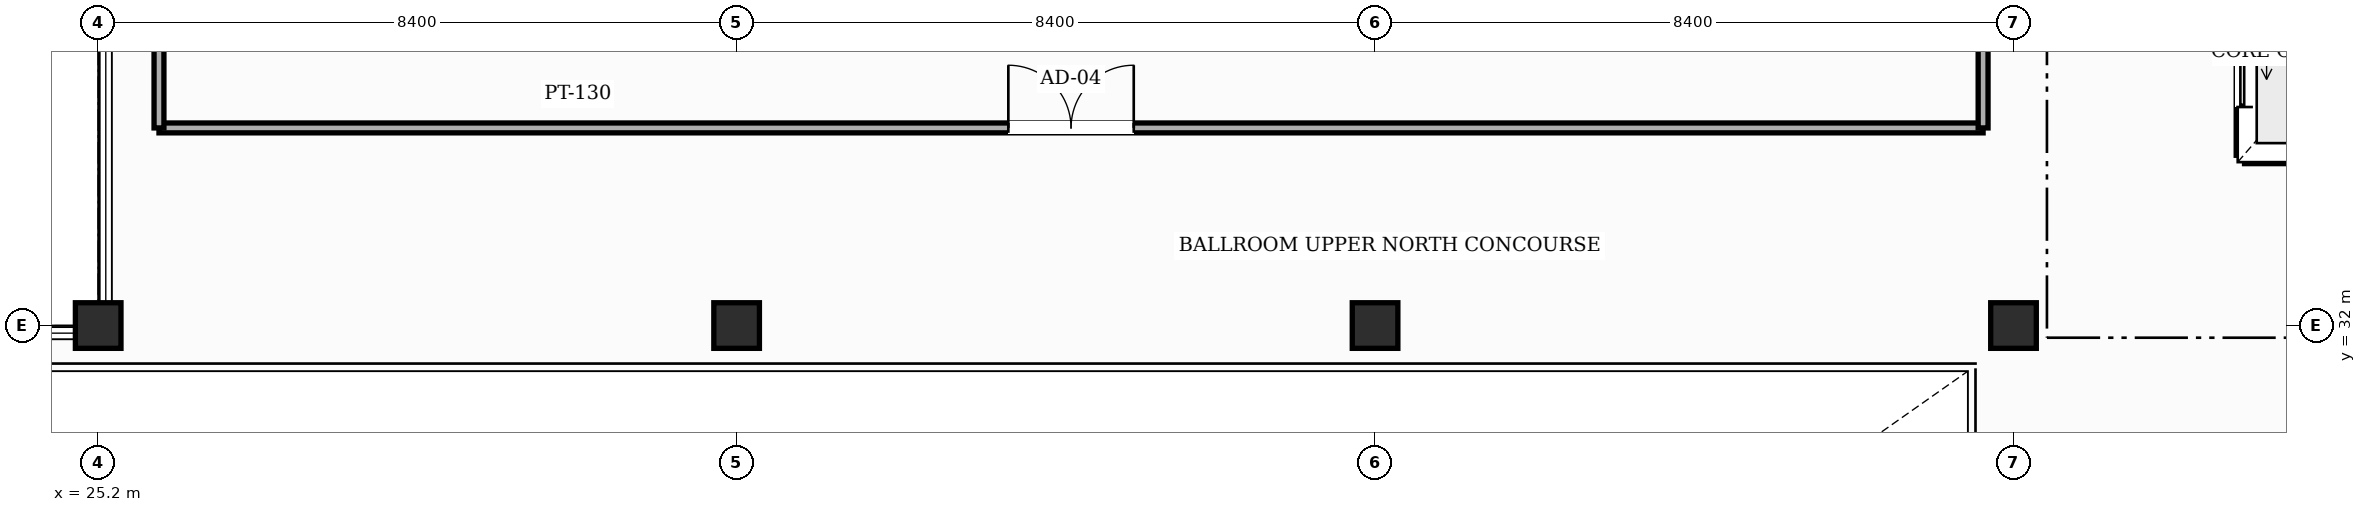
"""IFC4 building model, lengths in metres.
Left out: names, types, materials, properties, quantities, classifications, styles, units other than length and angle.
Written with IfcOpenShell. Run it as: python <this file> out.ifc"""

import sys

from ifc_helpers import new_model, si_unit, direction, frame, frame_2d, origin, origin_2d, place, context, subcontext, project, spatial, rectangle, hollow_rectangle, extrude, element, fill, save


model = new_model("IFC4")
c1 = context("Model", 3, precision=1e-05, world=origin(), true_north=direction((0.0, 1.0)))
c2 = subcontext(c1, "Body", "Model", "MODEL_VIEW")
j1 = project(units=[si_unit("LENGTHUNIT", "METRE"), si_unit("PLANEANGLEUNIT", "RADIAN")], contexts=[c1])
p1 = place(None, origin())
s1 = spatial("IfcSite", under=j1, at=p1, CompositionType="ELEMENT")
p2 = place(p1, origin())
s2 = spatial("IfcBuilding", under=s1, at=p2, CompositionType="ELEMENT")
p3 = place(p2, frame((0.0, 0.0, 5.4)))
s3 = spatial("IfcBuildingStorey", under=s2, at=p3, CompositionType="ELEMENT", Elevation=5.4)
p4 = place(p3, frame((25.2, 32.0, 0.0), z_axis=(0.0, 0.0, 1.0), x_axis=(1.0, 0.0, 0.0)))
e1 = element("IfcColumn", 1, at=p4, inside=s3, PredefinedType="COLUMN", context=c2, shape_type="SweptSolid", body=[
    extrude(hollow_rectangle(XDim=0.6, YDim=0.6, WallThickness=0.025, InnerFilletRadius=0.025, OuterFilletRadius=0.05, at=origin_2d()), origin(), (0.0, 0.0, 1.0), 4.55),
])
for number, where, z_axis, x_axis in (
    (2, (33.6, 32.0, 0.0), (0.0, 0.0, 1.0), (1.0, 0.0, 0.0)),
    (3, (42.0, 32.0, 0.0), (0.0, 0.0, 1.0), (1.0, 0.0, 0.0)),
    (4, (50.4, 32.0, 0.0), (0.0, 0.0, 1.0), (1.0, 0.0, 0.0)),
):
    element("IfcColumn", number, at=place(p3, frame(where, z_axis=z_axis, x_axis=x_axis)), inside=s3, PredefinedType="COLUMN", context=c2, shape_type="SweptSolid", body=[
        extrude(hollow_rectangle(XDim=0.6, YDim=0.6, WallThickness=0.025, InnerFilletRadius=0.025, OuterFilletRadius=0.05, at=origin_2d()), origin(), (0.0, 0.0, 1.0), 4.8),
    ])
p5 = place(p3, frame((53.44, 34.24, 0.0), z_axis=(0.0, 0.0, 1.0), x_axis=(1.0, 0.0, 0.0)))
e5 = element("IfcWall", 5, at=p5, inside=s3, PredefinedType="SHEAR", context=c2, shape_type="SweptSolid", body=[
    extrude(rectangle(XDim=2.32, YDim=0.22, at=frame_2d((1.16, 0.0))), origin(), (0.0, 0.0, 1.0), 4.55),
])
p6 = place(p3, frame((53.44, 34.24, 0.0), z_axis=(0.0, 0.0, 1.0), x_axis=(0.0, 1.0, 0.0)))
e6 = element("IfcWall", 6, at=p6, inside=s3, PredefinedType="SHEAR", context=c2, shape_type="SweptSolid", body=[
    extrude(rectangle(XDim=2.72, YDim=0.22, at=frame_2d((1.36, 0.0))), origin(), (0.0, 0.0, 1.0), 4.55),
])
p7 = place(p6, frame((0.635, 0.0, 0.0)))
e7 = element("IfcOpeningElement", 7, at=p7, cuts=e6, PredefinedType="OPENING", context=c2, shape_type="SweptSolid", body=[
    extrude(rectangle(XDim=1.45, YDim=2.35, at=frame_2d((0.725, 1.175))), frame((0.0, 0.12, 0.0), z_axis=(0.0, -1.0, 0.0), x_axis=(1.0, 0.0, 0.0)), (0.0, 0.0, 1.0), 0.24),
])
p8 = place(p3, frame((26.0, 34.6, 0.0), z_axis=(0.0, 0.0, 1.0), x_axis=(1.0, 0.0, 0.0)))
e8 = element("IfcWall", 8, at=p8, inside=s3, PredefinedType="PARTITIONING", context=c2, shape_type="SweptSolid", body=[
    extrude(rectangle(XDim=24.0, YDim=0.13, at=frame_2d((12.0, 0.0))), origin(), (0.0, 0.0, 1.0), 4.535),
])
p9 = place(p8, frame((11.175, 0.0, 0.0)))
e9 = element("IfcOpeningElement", 9, at=p9, cuts=e8, PredefinedType="OPENING", context=c2, shape_type="SweptSolid", body=[
    extrude(rectangle(XDim=1.65, YDim=2.35, at=frame_2d((0.825, 1.175))), frame((0.0, 0.075, 0.0), z_axis=(0.0, -1.0, 0.0), x_axis=(1.0, 0.0, 0.0)), (0.0, 0.0, 1.0), 0.15),
])
for number, where, z_axis, x_axis in (
    (10, (26.0, 34.6, 0.0), (0.0, 0.0, 1.0), (0.0, 1.0, 0.0)),
    (11, (50.0, 34.6, 0.0), (0.0, 0.0, 1.0), (0.0, 1.0, 0.0)),
):
    element("IfcWall", number, at=place(p3, frame(where, z_axis=z_axis, x_axis=x_axis)), inside=s3, PredefinedType="PARTITIONING", context=c2, shape_type="SweptSolid", body=[
        extrude(rectangle(XDim=4.6, YDim=0.13, at=frame_2d((2.3, 0.0))), origin(), (0.0, 0.0, 1.0), 4.535),
    ])
p10 = place(p7, origin())
e12 = element("IfcDoor", 12, at=p10, inside=s3, OperationType="SLIDING_TO_LEFT", PredefinedType="DOOR", context=c2, shape_type="SweptSolid", body=[
    extrude(rectangle(XDim=1.45, YDim=2.35, at=frame_2d((0.725, 1.175))), frame((0.0, 0.025, 0.0), z_axis=(0.0, -1.0, 0.0), x_axis=(1.0, 0.0, 0.0)), (0.0, 0.0, 1.0), 0.05),
])
fill(e7, e12)
p11 = place(p9, origin())
e13 = element("IfcDoor", 13, at=p11, inside=s3, OperationType="DOUBLE_DOOR_SINGLE_SWING", PredefinedType="DOOR", context=c2, shape_type="SweptSolid", body=[
    extrude(rectangle(XDim=1.65, YDim=2.35, at=frame_2d((0.825, 1.175))), frame((0.0, 0.025, 0.0), z_axis=(0.0, -1.0, 0.0), x_axis=(1.0, 0.0, 0.0)), (0.0, 0.0, 1.0), 0.05),
])
fill(e9, e13)
save(model, sys.argv[1])
